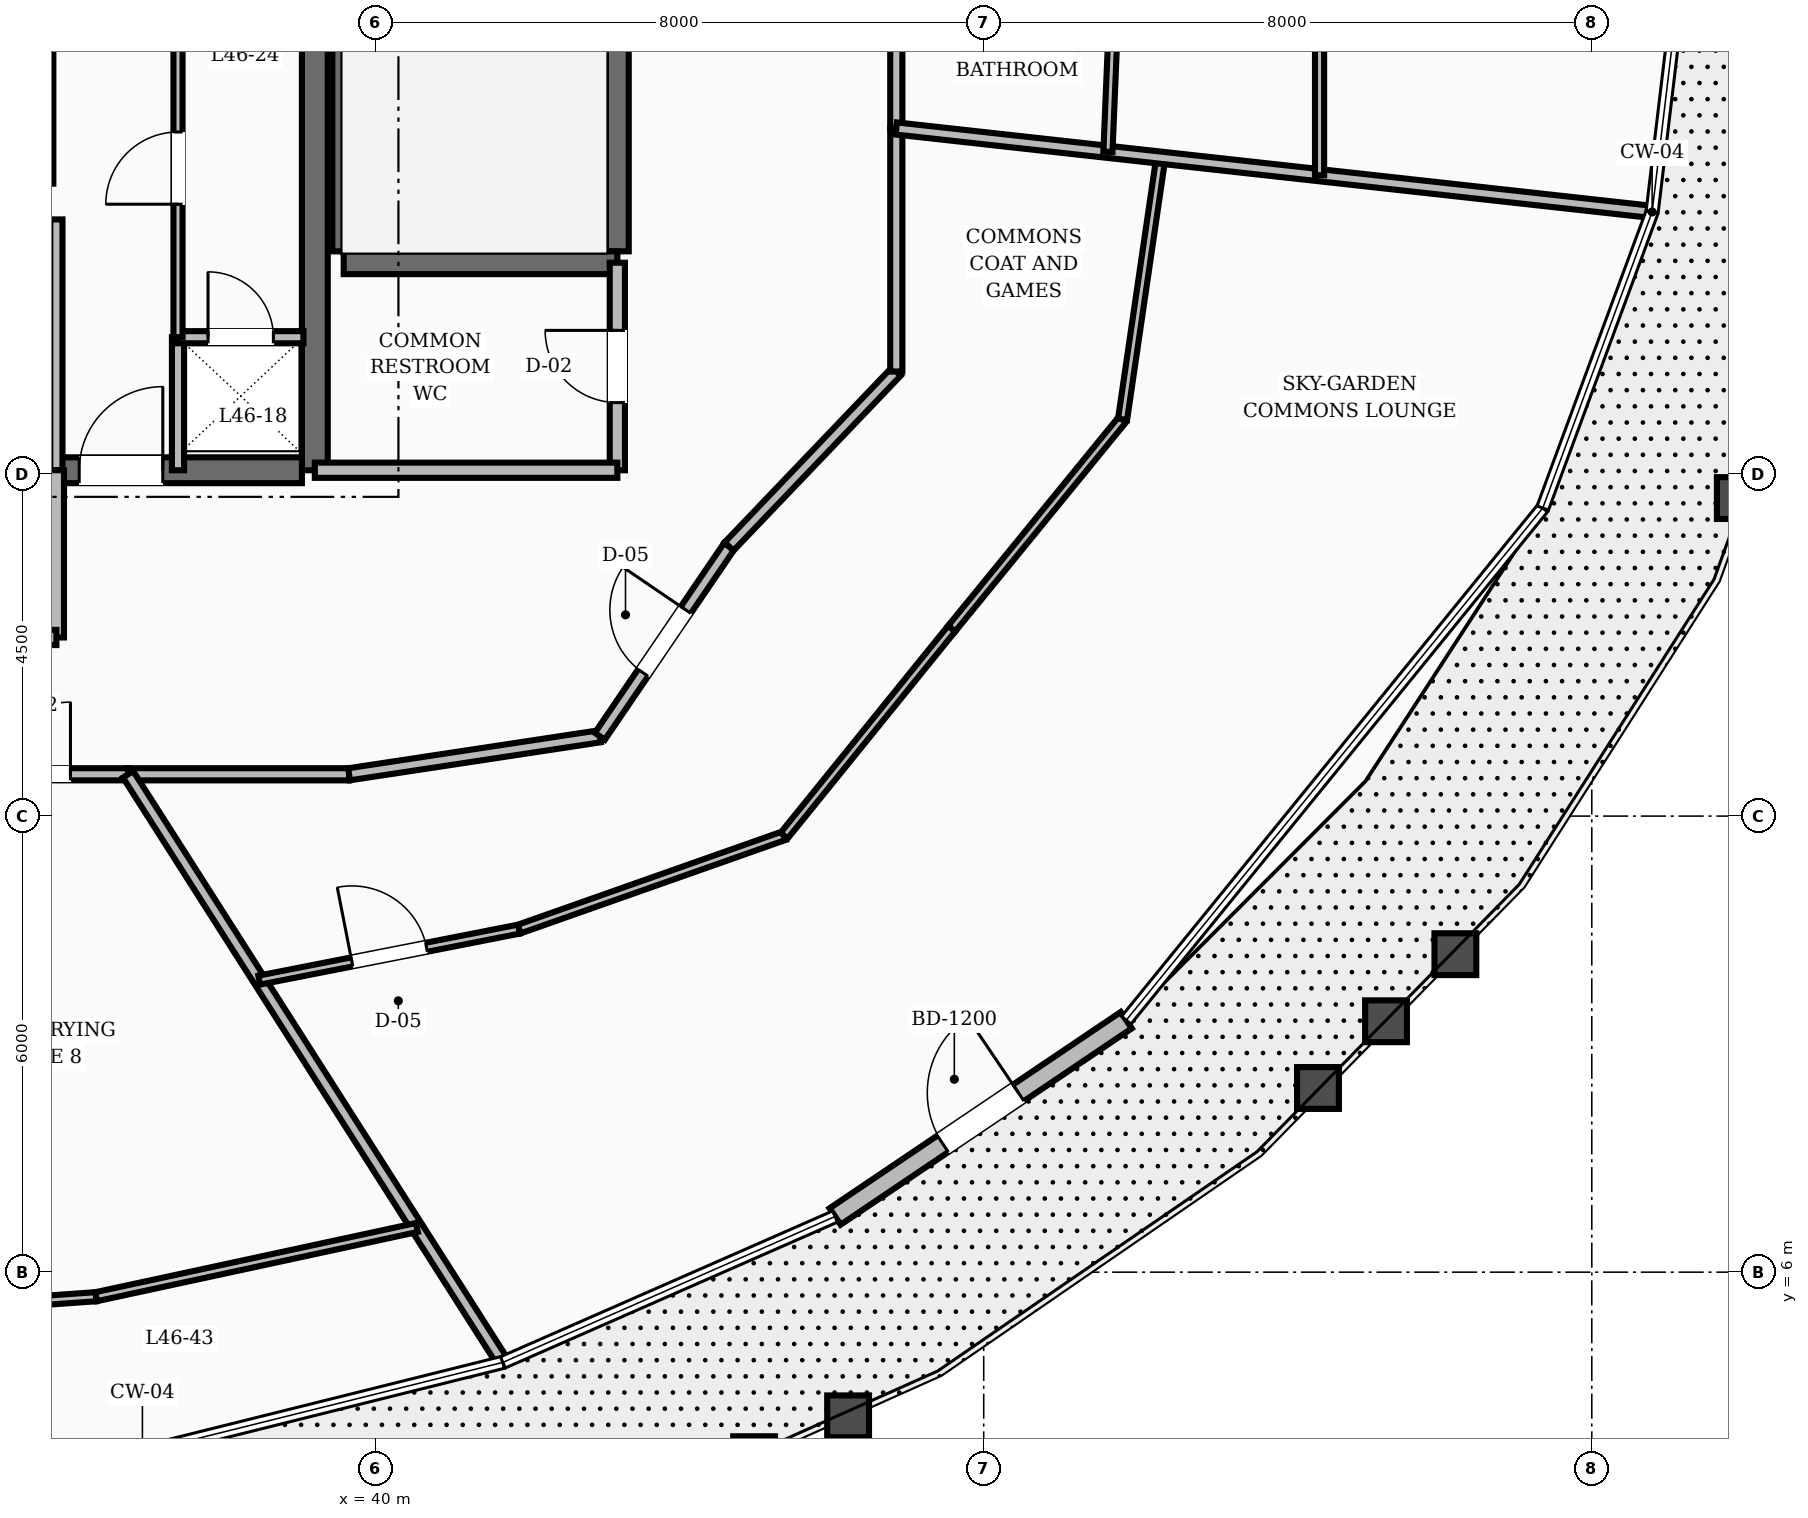
"""IFC4 building model, lengths in metres.
Left out: names, types, materials, properties, quantities, classifications, styles, units other than length and angle.
Written with IfcOpenShell. Run it as: python <this file> out.ifc"""

import sys

from ifc_helpers import new_model, si_unit, direction, frame, frame_2d, origin, place, context, subcontext, project, spatial, rectangle, extrude, element, fill, save


model = new_model("IFC4")
c1 = context("Model", 3, precision=1e-05, world=origin(), true_north=direction((0.0, 1.0)))
c2 = subcontext(c1, "Body", "Model", "MODEL_VIEW")
j1 = project(units=[si_unit("LENGTHUNIT", "METRE"), si_unit("PLANEANGLEUNIT", "RADIAN")], contexts=[c1])
p1 = place(None, origin())
s1 = spatial("IfcSite", under=j1, at=p1, CompositionType="ELEMENT")
p2 = place(p1, origin())
s2 = spatial("IfcBuilding", under=s1, at=p2, CompositionType="ELEMENT")
p3 = place(p2, frame((0.0, 0.0, 178.4)))
s3 = spatial("IfcBuildingStorey", under=s2, at=p3, CompositionType="ELEMENT", Elevation=178.4)
p4 = place(p3, frame((39.2, 16.55, 0.0), z_axis=(0.0, 0.0, 1.0), x_axis=(0.0, 1.0, 0.0)))
e1 = element("IfcWall", 1, at=p4, inside=s3, PredefinedType="SHEAR", context=c2, shape_type="SweptSolid", body=[
    extrude(rectangle(XDim=6.3, YDim=0.34, at=frame_2d((3.15, 0.0))), origin(), (0.0, 0.0, 1.0), 3.6),
])
p5 = place(p3, frame((35.8, 16.55, 0.0), z_axis=(0.0, 0.0, 1.0), x_axis=(1.0, 0.0, 0.0)))
e2 = element("IfcWall", 2, at=p5, inside=s3, PredefinedType="SHEAR", context=c2, shape_type="SweptSolid", body=[
    extrude(rectangle(XDim=3.23, YDim=0.34, at=frame_2d((1.615, 0.0))), origin(), (0.0, 0.0, 1.0), 3.6),
])
p6 = place(p5, frame((0.3, 0.0, 0.0)))
e3 = element("IfcOpeningElement", 3, at=p6, cuts=e2, PredefinedType="OPENING", context=c2, shape_type="SweptSolid", body=[
    extrude(rectangle(XDim=1.1, YDim=2.1, at=frame_2d((0.55, 1.05))), frame((0.0, 0.18, 0.0), z_axis=(0.0, -1.0, 0.0), x_axis=(1.0, 0.0, 0.0)), (0.0, 0.0, 1.0), 0.36),
])
for number, where, z_axis, x_axis in (
    (4, (43.18, 19.43, 0.0), (0.0, 0.0, 1.0), (0.0, 1.0, 0.0)),
    (5, (39.58, 19.43, 0.0), (0.0, 0.0, 1.0), (0.0, 1.0, 0.0)),
):
    element("IfcWall", number, at=place(p3, frame(where, z_axis=z_axis, x_axis=x_axis)), inside=s3, PredefinedType="SHEAR", context=c2, shape_type="SweptSolid", body=[
        extrude(rectangle(XDim=8.74, YDim=0.3, at=frame_2d((4.37, 0.0))), origin(), (0.0, 0.0, 1.0), 3.6),
    ])
p7 = place(p3, frame((39.58, 19.28, 0.0), z_axis=(0.0, 0.0, 1.0), x_axis=(1.0, 0.0, 0.0)))
e6 = element("IfcWall", 6, at=p7, inside=s3, PredefinedType="SHEAR", context=c2, shape_type="SweptSolid", body=[
    extrude(rectangle(XDim=3.6, YDim=0.3, at=frame_2d((1.8, 0.0))), origin(), (0.0, 0.0, 1.0), 3.6),
])
p8 = place(p3, frame((46.044, 6.732, 0.0), z_axis=(0.0, 0.0, 1.0), x_axis=(0.829153014487, 0.559021715649, 0.0)))
e7 = element("IfcWall", 7, at=p8, inside=s3, PredefinedType="STANDARD", context=c2, shape_type="SweptSolid", body=[
    extrude(rectangle(XDim=4.62, YDim=0.26, at=frame_2d((2.31, 0.0))), origin(), (0.0, 0.0, 1.0), 2.82),
])
p9 = place(p8, frame((1.71, 0.0, 0.0)))
e8 = element("IfcOpeningElement", 8, at=p9, cuts=e7, PredefinedType="OPENING", context=c2, shape_type="SweptSolid", body=[
    extrude(rectangle(XDim=1.2, YDim=2.15, at=frame_2d((0.6, 1.075))), frame((0.0, 0.14, 0.0), z_axis=(0.0, -1.0, 0.0), x_axis=(1.0, 0.0, 0.0)), (0.0, 0.0, 1.0), 0.28),
])
p10 = place(p3, frame((43.18, 16.55, 0.0), z_axis=(0.0, 0.0, 1.0), x_axis=(0.0, 1.0, 0.0)))
e9 = element("IfcWall", 9, at=p10, inside=s3, PredefinedType="SOLIDWALL", context=c2, shape_type="SweptSolid", body=[
    extrude(rectangle(XDim=2.73, YDim=0.2, at=frame_2d((1.365, 0.0))), origin(), (0.0, 0.0, 1.0), 2.8),
])
p11 = place(p10, frame((0.89, 0.0, 0.0)))
e10 = element("IfcOpeningElement", 10, at=p11, cuts=e9, PredefinedType="OPENING", context=c2, shape_type="SweptSolid", body=[
    extrude(rectangle(XDim=0.95, YDim=2.1, at=frame_2d((0.475, 1.05))), frame((0.0, 0.11, 0.0), z_axis=(0.0, -1.0, 0.0), x_axis=(1.0, 0.0, 0.0)), (0.0, 0.0, 1.0), 0.22),
])
p12 = place(p3, frame((39.2, 16.55, 0.0), z_axis=(0.0, 0.0, 1.0), x_axis=(1.0, 0.0, 0.0)))
e11 = element("IfcWall", 11, at=p12, inside=s3, PredefinedType="SOLIDWALL", context=c2, shape_type="SweptSolid", body=[
    extrude(rectangle(XDim=3.98, YDim=0.2, at=frame_2d((1.99, 0.0))), origin(), (0.0, 0.0, 1.0), 2.8),
])
p13 = place(p3, frame((35.8, 16.55, 0.0), z_axis=(0.0, 0.0, 1.0), x_axis=(0.0, 1.0, 0.0)))
e12 = element("IfcWall", 12, at=p13, inside=s3, PredefinedType="SOLIDWALL", context=c2, shape_type="SweptSolid", body=[
    extrude(rectangle(XDim=3.3, YDim=0.16, at=frame_2d((1.65, 0.0))), origin(), (0.0, 0.0, 1.0), 2.8),
])
p14 = place(p3, frame((37.4, 16.55, 0.0), z_axis=(0.0, 0.0, 1.0), x_axis=(0.0, 1.0, 0.0)))
e13 = element("IfcWall", 13, at=p14, inside=s3, PredefinedType="SOLIDWALL", context=c2, shape_type="SweptSolid", body=[
    extrude(rectangle(XDim=1.75, YDim=0.16, at=frame_2d((0.875, 0.0))), origin(), (0.0, 0.0, 1.0), 2.8),
])
p15 = place(p3, frame((35.8, 14.35, 0.0), z_axis=(0.0, 0.0, 1.0), x_axis=(0.0, 1.0, 0.0)))
e14 = element("IfcWall", 14, at=p15, inside=s3, PredefinedType="SOLIDWALL", context=c2, shape_type="SweptSolid", body=[
    extrude(rectangle(XDim=2.2, YDim=0.2, at=frame_2d((1.1, 0.0))), origin(), (0.0, 0.0, 1.0), 2.8),
])
p16 = place(p3, frame((28.2, 14.35, 0.0), z_axis=(0.0, 0.0, 1.0), x_axis=(1.0, 0.0, 0.0)))
e15 = element("IfcWall", 15, at=p16, inside=s3, PredefinedType="SOLIDWALL", context=c2, shape_type="SweptSolid", body=[
    extrude(rectangle(XDim=7.6, YDim=0.2, at=frame_2d((3.8, 0.0))), origin(), (0.0, 0.0, 1.0), 2.8),
])
p17 = place(p16, frame((3.2, 0.0, 0.0)))
e16 = element("IfcOpeningElement", 16, at=p17, cuts=e15, PredefinedType="OPENING", context=c2, shape_type="SweptSolid", body=[
    extrude(rectangle(XDim=1.2, YDim=2.1, at=frame_2d((0.6, 1.05))), frame((0.0, 0.11, 0.0), z_axis=(0.0, -1.0, 0.0), x_axis=(1.0, 0.0, 0.0)), (0.0, 0.0, 1.0), 0.22),
])
p18 = place(p3, frame((35.68, 20.32, 0.0), z_axis=(0.0, 0.0, 1.0), x_axis=(0.0, 1.0, 0.0)))
e17 = element("IfcWall", 17, at=p18, inside=s3, PredefinedType="SOLIDWALL", context=c2, shape_type="SweptSolid", body=[
    extrude(rectangle(XDim=2.36, YDim=0.16, at=frame_2d((1.18, 0.0))), origin(), (0.0, 0.0, 1.0), 2.8),
])
p19 = place(p3, frame((37.4, 18.3, 0.0), z_axis=(0.0, 0.0, 1.0), x_axis=(1.0, 0.0, 0.0)))
e18 = element("IfcWall", 18, at=p19, inside=s3, PredefinedType="SOLIDWALL", context=c2, shape_type="SweptSolid", body=[
    extrude(rectangle(XDim=1.65, YDim=0.16, at=frame_2d((0.825, 0.0))), origin(), (0.0, 0.0, 1.0), 2.8),
])
p20 = place(p19, frame((0.395, 0.0, 0.0)))
e19 = element("IfcOpeningElement", 19, at=p20, cuts=e18, PredefinedType="OPENING", context=c2, shape_type="SweptSolid", body=[
    extrude(rectangle(XDim=0.86, YDim=2.1, at=frame_2d((0.43, 1.05))), frame((0.0, 0.09, 0.0), z_axis=(0.0, -1.0, 0.0), x_axis=(1.0, 0.0, 0.0)), (0.0, 0.0, 1.0), 0.18),
])
p21 = place(p3, frame((37.4, 18.3, 0.0), z_axis=(0.0, 0.0, 1.0), x_axis=(0.0, 1.0, 0.0)))
e20 = element("IfcWall", 20, at=p21, inside=s3, PredefinedType="PARTITIONING", context=c2, shape_type="SweptSolid", body=[
    extrude(rectangle(XDim=4.45, YDim=0.12, at=frame_2d((2.225, 0.0))), origin(), (0.0, 0.0, 1.0), 2.8),
])
p22 = place(p21, frame((1.75, 0.0, 0.0)))
e21 = element("IfcOpeningElement", 21, at=p22, cuts=e20, PredefinedType="OPENING", context=c2, shape_type="SweptSolid", body=[
    extrude(rectangle(XDim=0.95, YDim=2.1, at=frame_2d((0.475, 1.05))), frame((0.0, 0.07, 0.0), z_axis=(0.0, -1.0, 0.0), x_axis=(1.0, 0.0, 0.0)), (0.0, 0.0, 1.0), 0.14),
])
p23 = place(p3, frame((34.278, 12.55, 0.0), z_axis=(0.0, 0.0, 1.0), x_axis=(1.0, 0.0, 0.0)))
e22 = element("IfcWall", 22, at=p23, inside=s3, PredefinedType="SOLIDWALL", context=c2, shape_type="SweptSolid", body=[
    extrude(rectangle(XDim=2.465, YDim=0.16, at=frame_2d((1.232, 0.0))), origin(), (0.0, 0.0, 1.0), 2.8),
])
p24 = place(p23, frame((0.758, 0.0, 0.0)))
e23 = element("IfcOpeningElement", 23, at=p24, cuts=e22, PredefinedType="OPENING", context=c2, shape_type="SweptSolid", body=[
    extrude(rectangle(XDim=0.95, YDim=2.1, at=frame_2d((0.475, 1.05))), frame((0.0, 0.09, 0.0), z_axis=(0.0, -1.0, 0.0), x_axis=(1.0, 0.0, 0.0)), (0.0, 0.0, 1.0), 0.18),
])
p25 = place(p3, frame((36.743, 12.55, 0.0), z_axis=(0.0, 0.0, 1.0), x_axis=(1.0, 0.0, 0.0)))
e24 = element("IfcWall", 24, at=p25, inside=s3, PredefinedType="SOLIDWALL", context=c2, shape_type="SweptSolid", body=[
    extrude(rectangle(XDim=2.908, YDim=0.16, at=frame_2d((1.454, 0.0))), origin(), (0.0, 0.0, 1.0), 2.8),
])
p26 = place(p3, frame((39.651, 12.55, 0.0), z_axis=(0.0, 0.0, 1.0), x_axis=(0.988710906508, 0.149835721217, 0.0)))
e25 = element("IfcWall", 25, at=p26, inside=s3, PredefinedType="SOLIDWALL", context=c2, shape_type="SweptSolid", body=[
    extrude(rectangle(XDim=3.337, YDim=0.16, at=frame_2d((1.668, 0.0))), origin(), (0.0, 0.0, 1.0), 2.8),
])
p27 = place(p3, frame((42.95, 13.05, 0.0), z_axis=(0.0, 0.0, 1.0), x_axis=(0.562674669208, 0.826678423955, 0.0)))
e26 = element("IfcWall", 26, at=p27, inside=s3, PredefinedType="SOLIDWALL", context=c2, shape_type="SweptSolid", body=[
    extrude(rectangle(XDim=3.021, YDim=0.16, at=frame_2d((1.511, 0.0))), origin(), (0.0, 0.0, 1.0), 2.8),
])
p28 = place(p27, frame((1.01, 0.0, 0.0)))
e27 = element("IfcOpeningElement", 27, at=p28, cuts=e26, PredefinedType="OPENING", context=c2, shape_type="SweptSolid", body=[
    extrude(rectangle(XDim=1.0, YDim=2.1, at=frame_2d((0.5, 1.05))), frame((0.0, 0.09, 0.0), z_axis=(0.0, -1.0, 0.0), x_axis=(1.0, 0.0, 0.0)), (0.0, 0.0, 1.0), 0.18),
])
p29 = place(p3, frame((44.65, 15.548, 0.0), z_axis=(0.0, 0.0, 1.0), x_axis=(0.691055487108, 0.722801711216, 0.0)))
e28 = element("IfcWall", 28, at=p29, inside=s3, PredefinedType="SOLIDWALL", context=c2, shape_type="SweptSolid", body=[
    extrude(rectangle(XDim=3.184, YDim=0.16, at=frame_2d((1.592, 0.0))), origin(), (0.0, 0.0, 1.0), 2.8),
])
p30 = place(p3, frame((46.85, 17.849, 0.0), z_axis=(0.0, 0.0, 1.0), x_axis=(0.0, 1.0, 0.0)))
e29 = element("IfcWall", 29, at=p30, inside=s3, PredefinedType="SOLIDWALL", context=c2, shape_type="SweptSolid", body=[
    extrude(rectangle(XDim=3.197, YDim=0.16, at=frame_2d((1.599, 0.0))), origin(), (0.0, 0.0, 1.0), 2.8),
])
p31 = place(p3, frame((46.85, 21.046, 0.0), z_axis=(0.0, 0.0, 1.0), x_axis=(0.0, 1.0, 0.0)))
e30 = element("IfcWall", 30, at=p31, inside=s3, PredefinedType="SOLIDWALL", context=c2, shape_type="SweptSolid", body=[
    extrude(rectangle(XDim=2.954, YDim=0.16, at=frame_2d((1.477, 0.0))), origin(), (0.0, 0.0, 1.0), 2.8),
])
p32 = place(p3, frame((36.743, 12.55, 0.0), z_axis=(0.0, 0.0, 1.0), x_axis=(0.537486473019, -0.84327237078, 0.0)))
e31 = element("IfcWall", 31, at=p32, inside=s3, PredefinedType="SOLIDWALL", context=c2, shape_type="SweptSolid", body=[
    extrude(rectangle(XDim=9.125, YDim=0.16, at=frame_2d((4.562, 0.0))), origin(), (0.0, 0.0, 1.0), 2.8),
])
p33 = place(p3, frame((38.469, 9.842, 0.0), z_axis=(0.0, 0.0, 1.0), x_axis=(0.981253788754, 0.192720009485, 0.0)))
e32 = element("IfcWall", 32, at=p33, inside=s3, PredefinedType="PARTITIONING", context=c2, shape_type="SweptSolid", body=[
    extrude(rectangle(XDim=3.485, YDim=0.12, at=frame_2d((1.743, 0.0))), origin(), (0.0, 0.0, 1.0), 2.8),
])
p34 = place(p33, frame((1.243, 0.0, 0.0)))
e33 = element("IfcOpeningElement", 33, at=p34, cuts=e32, PredefinedType="OPENING", context=c2, shape_type="SweptSolid", body=[
    extrude(rectangle(XDim=1.0, YDim=2.1, at=frame_2d((0.5, 1.05))), frame((0.0, 0.07, 0.0), z_axis=(0.0, -1.0, 0.0), x_axis=(1.0, 0.0, 0.0)), (0.0, 0.0, 1.0), 0.14),
])
p35 = place(p3, frame((41.888, 10.514, 0.0), z_axis=(0.0, 0.0, 1.0), x_axis=(0.943085422762, 0.332550575664, 0.0)))
e34 = element("IfcWall", 34, at=p35, inside=s3, PredefinedType="PARTITIONING", context=c2, shape_type="SweptSolid", body=[
    extrude(rectangle(XDim=3.696, YDim=0.12, at=frame_2d((1.848, 0.0))), origin(), (0.0, 0.0, 1.0), 2.8),
])
p36 = place(p3, frame((45.374, 11.743, 0.0), z_axis=(0.0, 0.0, 1.0), x_axis=(0.629110070273, 0.777316228752, 0.0)))
e35 = element("IfcWall", 35, at=p36, inside=s3, PredefinedType="PARTITIONING", context=c2, shape_type="SweptSolid", body=[
    extrude(rectangle(XDim=3.505, YDim=0.12, at=frame_2d((1.753, 0.0))), origin(), (0.0, 0.0, 1.0), 2.8),
])
p37 = place(p3, frame((47.579, 14.468, 0.0), z_axis=(0.0, 0.0, 1.0), x_axis=(0.632496792846, 0.774562978097, 0.0)))
e36 = element("IfcWall", 36, at=p37, inside=s3, PredefinedType="PARTITIONING", context=c2, shape_type="SweptSolid", body=[
    extrude(rectangle(XDim=3.554, YDim=0.12, at=frame_2d((1.777, 0.0))), origin(), (0.0, 0.0, 1.0), 2.8),
])
p38 = place(p3, frame((49.827, 17.22, 0.0), z_axis=(0.0, 0.0, 1.0), x_axis=(0.144722086216, 0.989472343101, 0.0)))
e37 = element("IfcWall", 37, at=p38, inside=s3, PredefinedType="PARTITIONING", context=c2, shape_type="SweptSolid", body=[
    extrude(rectangle(XDim=3.479, YDim=0.12, at=frame_2d((1.739, 0.0))), origin(), (0.0, 0.0, 1.0), 2.8),
])
p39 = place(p3, frame((46.85, 21.046, 0.0), z_axis=(0.0, 0.0, 1.0), x_axis=(0.99396125521, -0.109731595909, 0.0)))
e38 = element("IfcWall", 38, at=p39, inside=s3, PredefinedType="SOLIDWALL", context=c2, shape_type="SweptSolid", body=[
    extrude(rectangle(XDim=9.954, YDim=0.16, at=frame_2d((4.977, 0.0))), origin(), (0.0, 0.0, 1.0), 2.8),
])
p40 = place(p3, frame((49.634, 20.739, 0.0), z_axis=(0.0, 0.0, 1.0), x_axis=(0.041661655892, 0.999131776308, 0.0)))
e39 = element("IfcWall", 39, at=p40, inside=s3, PredefinedType="PARTITIONING", context=c2, shape_type="SweptSolid", body=[
    extrude(rectangle(XDim=3.264, YDim=0.12, at=frame_2d((1.632, 0.0))), origin(), (0.0, 0.0, 1.0), 2.8),
])
p41 = place(p3, frame((52.418, 20.431, 0.0), z_axis=(0.0, 0.0, 1.0), x_axis=(0.0, 1.0, 0.0)))
e40 = element("IfcWall", 40, at=p41, inside=s3, PredefinedType="PARTITIONING", context=c2, shape_type="SweptSolid", body=[
    extrude(rectangle(XDim=7.137, YDim=0.12, at=frame_2d((3.569, 0.0))), origin(), (0.0, 0.0, 1.0), 2.8),
])
p42 = place(p41, frame((4.261, 0.0, 0.0)))
e41 = element("IfcOpeningElement", 41, at=p42, cuts=e40, PredefinedType="OPENING", context=c2, shape_type="SweptSolid", body=[
    extrude(rectangle(XDim=0.95, YDim=2.1, at=frame_2d((0.475, 1.05))), frame((0.0, 0.07, 0.0), z_axis=(0.0, -1.0, 0.0), x_axis=(1.0, 0.0, 0.0)), (0.0, 0.0, 1.0), 0.14),
])
p43 = place(p3, frame((32.0, 5.37, 0.0), z_axis=(0.0, 0.0, 1.0), x_axis=(0.997477822503, 0.070978825117, 0.0)))
e42 = element("IfcWall", 42, at=p43, inside=s3, PredefinedType="PARTITIONING", context=c2, shape_type="SweptSolid", body=[
    extrude(rectangle(XDim=4.334, YDim=0.12, at=frame_2d((2.167, 0.0))), origin(), (0.0, 0.0, 1.0), 2.8),
])
p44 = place(p43, frame((1.692, 0.0, 0.0)))
e43 = element("IfcOpeningElement", 43, at=p44, cuts=e42, PredefinedType="OPENING", context=c2, shape_type="SweptSolid", body=[
    extrude(rectangle(XDim=0.95, YDim=2.1, at=frame_2d((0.475, 1.05))), frame((0.0, 0.07, 0.0), z_axis=(0.0, -1.0, 0.0), x_axis=(1.0, 0.0, 0.0)), (0.0, 0.0, 1.0), 0.14),
])
p45 = place(p3, frame((36.323, 5.677, 0.0), z_axis=(0.0, 0.0, 1.0), x_axis=(0.97749681164, 0.210950191357, 0.0)))
e44 = element("IfcWall", 44, at=p45, inside=s3, PredefinedType="PARTITIONING", context=c2, shape_type="SweptSolid", body=[
    extrude(rectangle(XDim=4.317, YDim=0.12, at=frame_2d((2.158, 0.0))), origin(), (0.0, 0.0, 1.0), 2.8),
])
p46 = place(p9, origin())
e45 = element("IfcDoor", 45, at=p46, inside=s3, OperationType="SINGLE_SWING_RIGHT", PredefinedType="DOOR", context=c2, shape_type="SweptSolid", body=[
    extrude(rectangle(XDim=1.2, YDim=2.15, at=frame_2d((0.6, 1.075))), frame((0.0, 0.025, 0.0), z_axis=(0.0, -1.0, 0.0), x_axis=(1.0, 0.0, 0.0)), (0.0, 0.0, 1.0), 0.05),
])
fill(e8, e45)
p47 = place(p11, origin())
e46 = element("IfcDoor", 46, at=p47, inside=s3, OperationType="SINGLE_SWING_RIGHT", PredefinedType="DOOR", context=c2, shape_type="SweptSolid", body=[
    extrude(rectangle(XDim=0.95, YDim=2.1, at=frame_2d((0.475, 1.05))), frame((0.0, 0.025, 0.0), z_axis=(0.0, -1.0, 0.0), x_axis=(1.0, 0.0, 0.0)), (0.0, 0.0, 1.0), 0.05),
])
fill(e10, e46)
p48 = place(p6, origin())
e47 = element("IfcDoor", 47, at=p48, inside=s3, OperationType="SINGLE_SWING_RIGHT", PredefinedType="DOOR", context=c2, shape_type="SweptSolid", body=[
    extrude(rectangle(XDim=1.1, YDim=2.1, at=frame_2d((0.55, 1.05))), frame((0.0, 0.025, 0.0), z_axis=(0.0, -1.0, 0.0), x_axis=(1.0, 0.0, 0.0)), (0.0, 0.0, 1.0), 0.05),
])
fill(e3, e47)
p49 = place(p20, origin())
e48 = element("IfcDoor", 48, at=p49, inside=s3, OperationType="SINGLE_SWING_LEFT", PredefinedType="TRAPDOOR", context=c2, shape_type="SweptSolid", body=[
    extrude(rectangle(XDim=0.86, YDim=2.1, at=frame_2d((0.43, 1.05))), frame((0.0, 0.025, 0.0), z_axis=(0.0, -1.0, 0.0), x_axis=(1.0, 0.0, 0.0)), (0.0, 0.0, 1.0), 0.05),
])
fill(e19, e48)
p50 = place(p22, origin())
e49 = element("IfcDoor", 49, at=p50, inside=s3, OperationType="SINGLE_SWING_LEFT", PredefinedType="DOOR", context=c2, shape_type="SweptSolid", body=[
    extrude(rectangle(XDim=0.95, YDim=2.1, at=frame_2d((0.475, 1.05))), frame((0.0, 0.025, 0.0), z_axis=(0.0, -1.0, 0.0), x_axis=(1.0, 0.0, 0.0)), (0.0, 0.0, 1.0), 0.05),
])
fill(e21, e49)
p51 = place(p28, origin())
e50 = element("IfcDoor", 50, at=p51, inside=s3, OperationType="SINGLE_SWING_RIGHT", PredefinedType="DOOR", context=c2, shape_type="SweptSolid", body=[
    extrude(rectangle(XDim=1.0, YDim=2.1, at=frame_2d((0.5, 1.05))), frame((0.0, 0.025, 0.0), z_axis=(0.0, -1.0, 0.0), x_axis=(1.0, 0.0, 0.0)), (0.0, 0.0, 1.0), 0.05),
])
fill(e27, e50)
p52 = place(p34, origin())
e51 = element("IfcDoor", 51, at=p52, inside=s3, OperationType="SINGLE_SWING_LEFT", PredefinedType="DOOR", context=c2, shape_type="SweptSolid", body=[
    extrude(rectangle(XDim=1.0, YDim=2.1, at=frame_2d((0.5, 1.05))), frame((0.0, 0.025, 0.0), z_axis=(0.0, -1.0, 0.0), x_axis=(1.0, 0.0, 0.0)), (0.0, 0.0, 1.0), 0.05),
])
fill(e33, e51)
p53 = place(p24, origin())
e52 = element("IfcDoor", 52, at=p53, inside=s3, OperationType="SINGLE_SWING_RIGHT", PredefinedType="DOOR", context=c2, shape_type="SweptSolid", body=[
    extrude(rectangle(XDim=0.95, YDim=2.1, at=frame_2d((0.475, 1.05))), frame((0.0, 0.025, 0.0), z_axis=(0.0, -1.0, 0.0), x_axis=(1.0, 0.0, 0.0)), (0.0, 0.0, 1.0), 0.05),
])
fill(e23, e52)
save(model, sys.argv[1])
